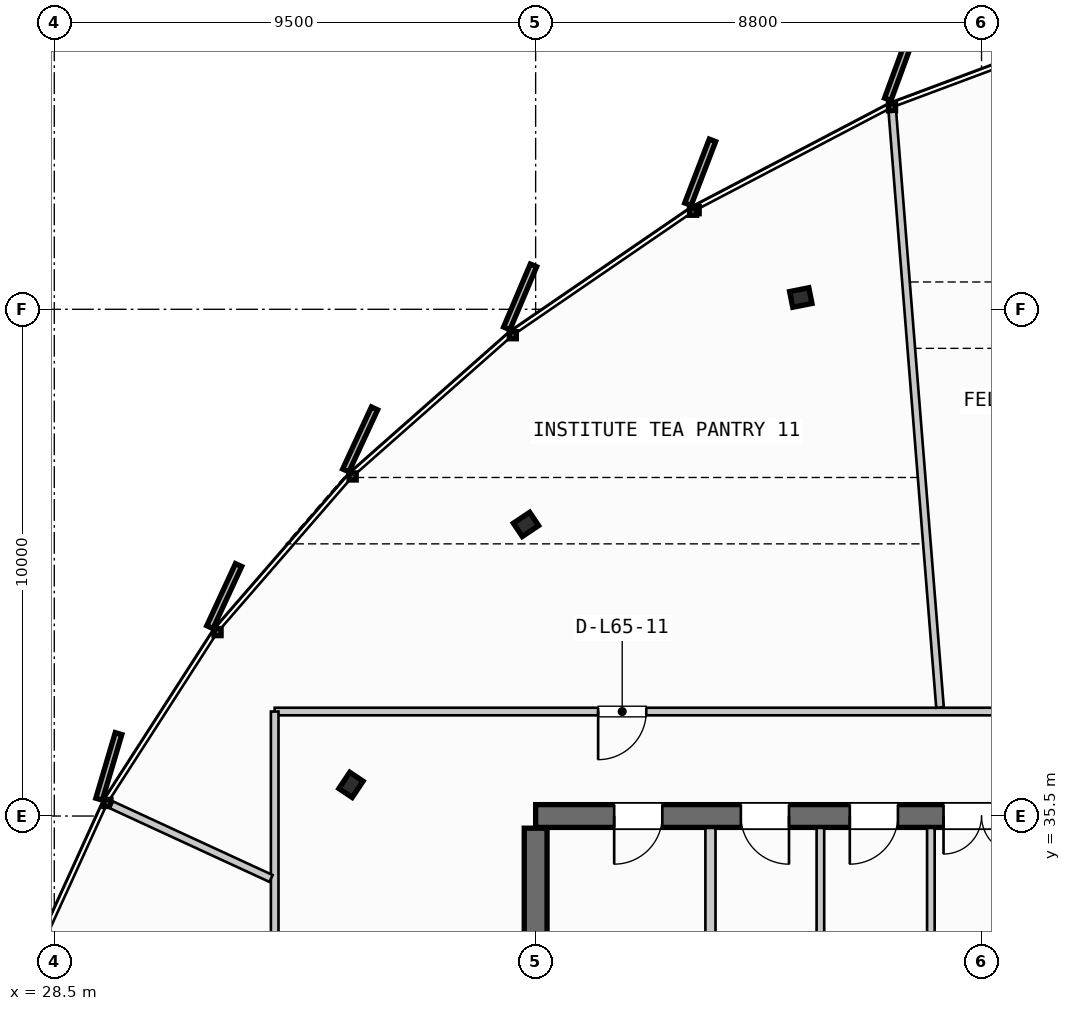
"""IFC4 building model, lengths in metres.
Left out: names, types, materials, properties, quantities, classifications, styles, units other than length and angle.
Written with IfcOpenShell. Run it as: python <this file> out.ifc"""

import sys

from ifc_helpers import new_model, si_unit, direction, frame, frame_2d, origin, origin_2d, place, context, subcontext, project, spatial, rectangle, i_section, extrude, source, transform, mapped, element, fill, save


model = new_model("IFC4")
c1 = context("Model", 3, precision=1e-05, world=origin(), true_north=direction((0.0, 1.0)))
c2 = subcontext(c1, "Body", "Model", "MODEL_VIEW")
j1 = project(units=[si_unit("LENGTHUNIT", "METRE"), si_unit("PLANEANGLEUNIT", "RADIAN")], contexts=[c1])
p1 = place(None, origin())
s1 = spatial("IfcSite", under=j1, at=p1, CompositionType="ELEMENT")
p2 = place(p1, origin())
s2 = spatial("IfcBuilding", under=s1, at=p2, CompositionType="ELEMENT")
p3 = place(p2, frame((0.0, 0.0, 249.1)))
s3 = spatial("IfcBuildingStorey", under=s2, at=p3, CompositionType="ELEMENT", Elevation=249.1)
p4 = place(p3, frame((55.6, 35.5, 0.0), z_axis=(0.0, 0.0, 1.0), x_axis=(-1.0, 0.0, 0.0)))
e1 = element("IfcWall", 1, at=p4, inside=s3, PredefinedType="SHEAR", context=c2, shape_type="SweptSolid", body=[
    extrude(rectangle(XDim=17.6, YDim=0.45, at=frame_2d((8.8, 0.0))), origin(), (0.0, 0.0, 1.0), 3.21),
])
p5 = place(p4, frame((8.05, 0.0, 0.0)))
e2 = element("IfcOpeningElement", 2, at=p5, cuts=e1, PredefinedType="OPENING", context=c2, shape_type="SweptSolid", body=[
    extrude(rectangle(XDim=1.5, YDim=2.2, at=frame_2d((0.75, 1.1))), frame((0.0, 0.235, 0.0), z_axis=(0.0, -1.0, 0.0), x_axis=(1.0, 0.0, 0.0)), (0.0, 0.0, 1.0), 0.47),
])
p6 = place(p4, frame((15.1, 0.0, 0.0)))
e3 = element("IfcOpeningElement", 3, at=p6, cuts=e1, PredefinedType="OPENING", context=c2, shape_type="SweptSolid", body=[
    extrude(rectangle(XDim=0.95, YDim=2.15, at=frame_2d((0.475, 1.075))), frame((0.0, 0.235, 0.0), z_axis=(0.0, -1.0, 0.0), x_axis=(1.0, 0.0, 0.0)), (0.0, 0.0, 1.0), 0.47),
])
p7 = place(p4, frame((12.6, 0.0, 0.0)))
e4 = element("IfcOpeningElement", 4, at=p7, cuts=e1, PredefinedType="OPENING", context=c2, shape_type="SweptSolid", body=[
    extrude(rectangle(XDim=0.95, YDim=2.15, at=frame_2d((0.475, 1.075))), frame((0.0, 0.235, 0.0), z_axis=(0.0, -1.0, 0.0), x_axis=(1.0, 0.0, 0.0)), (0.0, 0.0, 1.0), 0.47),
])
p8 = place(p4, frame((10.45, 0.0, 0.0)))
e5 = element("IfcOpeningElement", 5, at=p8, cuts=e1, PredefinedType="OPENING", context=c2, shape_type="SweptSolid", body=[
    extrude(rectangle(XDim=0.95, YDim=2.15, at=frame_2d((0.475, 1.075))), frame((0.0, 0.235, 0.0), z_axis=(0.0, -1.0, 0.0), x_axis=(1.0, 0.0, 0.0)), (0.0, 0.0, 1.0), 0.47),
])
p9 = place(p3, frame((38.0, 35.26, 0.0), z_axis=(0.0, 0.0, 1.0), x_axis=(0.0, -1.0, 0.0)))
e6 = element("IfcWall", 6, at=p9, inside=s3, PredefinedType="SHEAR", context=c2, shape_type="SweptSolid", body=[
    extrude(rectangle(XDim=14.92, YDim=0.45, at=frame_2d((7.46, 0.0))), origin(), (0.0, 0.0, 1.0), 3.21),
])
p10 = place(p9, frame((5.21, 0.0, 0.0)))
e7 = element("IfcOpeningElement", 7, at=p10, cuts=e6, PredefinedType="OPENING", context=c2, shape_type="SweptSolid", body=[
    extrude(rectangle(XDim=1.1, YDim=2.2, at=frame_2d((0.55, 1.1))), frame((0.0, 0.235, 0.0), z_axis=(0.0, -1.0, 0.0), x_axis=(1.0, 0.0, 0.0)), (0.0, 0.0, 1.0), 0.47),
])
m1 = source(origin(), c2, "Body", "SweptSolid", [
    extrude(i_section(OverallWidth=0.387, OverallDepth=0.316, WebThickness=0.019, FlangeThickness=0.028, FilletRadius=0.015, at=origin_2d()), origin(), (0.0, 0.0, 1.0), 3.21),
])
for number, where, z_axis, x_axis in (
    (8, (43.233, 45.732, 0.0), (0.0, 0.0, 1.0), (-0.195, 0.981, 0.0)),
    (9, (37.81, 41.255, 0.0), (0.0, 0.0, 1.0), (-0.556, 0.831, 0.0)),
    (10, (34.356, 36.115, 0.0), (0.0, 0.0, 1.0), (-0.831, 0.556, 0.0)),
):
    element("IfcColumn", number, at=place(p3, frame(where, z_axis=z_axis, x_axis=x_axis)), inside=s3, PredefinedType="COLUMN", context=c2, shape_type="MappedRepresentation", body=[
        mapped(m1, transform((0.0, 0.0, 0.0), scale=1.0)),
    ])
p11 = place(p3, frame((41.45, 31.85, 0.0), z_axis=(0.0, 0.0, 1.0), x_axis=(0.0, 1.0, 0.0)))
e11 = element("IfcWall", 11, at=p11, inside=s3, PredefinedType="PARTITIONING", context=c2, shape_type="SweptSolid", body=[
    extrude(rectangle(XDim=3.415, YDim=0.2, at=frame_2d((1.708, 0.0))), origin(), (0.0, 0.0, 1.0), 2.28),
])
p12 = place(p3, frame((45.8, 31.85, 0.0), z_axis=(0.0, 0.0, 1.0), x_axis=(0.0, 1.0, 0.0)))
e12 = element("IfcWall", 12, at=p12, inside=s3, PredefinedType="PARTITIONING", context=c2, shape_type="SweptSolid", body=[
    extrude(rectangle(XDim=3.415, YDim=0.15, at=frame_2d((1.708, 0.0))), origin(), (0.0, 0.0, 1.0), 2.28),
])
p13 = place(p3, frame((43.62, 31.85, 0.0), z_axis=(0.0, 0.0, 1.0), x_axis=(0.0, 1.0, 0.0)))
e13 = element("IfcWall", 13, at=p13, inside=s3, PredefinedType="PLUMBINGWALL", context=c2, shape_type="SweptSolid", body=[
    extrude(rectangle(XDim=3.415, YDim=0.15, at=frame_2d((1.708, 0.0))), origin(), (0.0, 0.0, 1.0), 2.28),
])
p14 = place(p3, frame((60.888, 37.562, 0.0), z_axis=(0.0, 0.0, 1.0), x_axis=(-1.0, 0.0, 0.0)))
e14 = element("IfcWall", 14, at=p14, inside=s3, PredefinedType="PARTITIONING", context=c2, shape_type="SweptSolid", body=[
    extrude(rectangle(XDim=28.038, YDim=0.15, at=frame_2d((14.019, 0.0))), origin(), (0.0, 0.0, 1.0), 2.28),
])
p15 = place(p14, frame((4.824, 0.0, 0.0)))
e15 = element("IfcOpeningElement", 15, at=p15, cuts=e14, PredefinedType="OPENING", context=c2, shape_type="SweptSolid", body=[
    extrude(rectangle(XDim=0.95, YDim=2.15, at=frame_2d((0.475, 1.075))), frame((0.0, 0.085, 0.0), z_axis=(0.0, -1.0, 0.0), x_axis=(1.0, 0.0, 0.0)), (0.0, 0.0, 1.0), 0.17),
])
p16 = place(p14, frame((11.973, 0.0, 0.0)))
e16 = element("IfcOpeningElement", 16, at=p16, cuts=e14, PredefinedType="OPENING", context=c2, shape_type="SweptSolid", body=[
    extrude(rectangle(XDim=0.95, YDim=2.15, at=frame_2d((0.475, 1.075))), frame((0.0, 0.085, 0.0), z_axis=(0.0, -1.0, 0.0), x_axis=(1.0, 0.0, 0.0)), (0.0, 0.0, 1.0), 0.17),
])
p17 = place(p14, frame((20.705, 0.0, 0.0)))
e17 = element("IfcOpeningElement", 17, at=p17, cuts=e14, PredefinedType="OPENING", context=c2, shape_type="SweptSolid", body=[
    extrude(rectangle(XDim=0.95, YDim=2.15, at=frame_2d((0.475, 1.075))), frame((0.0, 0.085, 0.0), z_axis=(0.0, -1.0, 0.0), x_axis=(1.0, 0.0, 0.0)), (0.0, 0.0, 1.0), 0.17),
])
p18 = place(p3, frame((32.85, 37.562, 0.0), z_axis=(0.0, 0.0, 1.0), x_axis=(0.0, -1.0, 0.0)))
e18 = element("IfcWall", 18, at=p18, inside=s3, PredefinedType="PARTITIONING", context=c2, shape_type="SweptSolid", body=[
    extrude(rectangle(XDim=19.293, YDim=0.15, at=frame_2d((9.646, 0.0))), origin(), (0.0, 0.0, 1.0), 2.28),
])
p19 = place(p18, frame((15.323, 0.0, 0.0)))
e19 = element("IfcOpeningElement", 19, at=p19, cuts=e18, PredefinedType="OPENING", context=c2, shape_type="SweptSolid", body=[
    extrude(rectangle(XDim=0.95, YDim=2.15, at=frame_2d((0.475, 1.075))), frame((0.0, 0.085, 0.0), z_axis=(0.0, -1.0, 0.0), x_axis=(1.0, 0.0, 0.0)), (0.0, 0.0, 1.0), 0.17),
])
p20 = place(p18, frame((8.408, 0.0, 0.0)))
e20 = element("IfcOpeningElement", 20, at=p20, cuts=e18, PredefinedType="OPENING", context=c2, shape_type="SweptSolid", body=[
    extrude(rectangle(XDim=0.95, YDim=2.15, at=frame_2d((0.475, 1.075))), frame((0.0, 0.085, 0.0), z_axis=(0.0, -1.0, 0.0), x_axis=(1.0, 0.0, 0.0)), (0.0, 0.0, 1.0), 0.17),
])
p21 = place(p3, frame((45.981, 37.642, 0.0), z_axis=(0.0, 0.0, 1.0), x_axis=(-0.079751805429, 0.996814751863, 0.0)))
e21 = element("IfcWall", 21, at=p21, inside=s3, PredefinedType="PARTITIONING", context=c2, shape_type="SweptSolid", body=[
    extrude(rectangle(XDim=11.792, YDim=0.15, at=frame_2d((5.896, 0.0))), origin(), (0.0, 0.0, 1.0), 2.28),
])
p22 = place(p3, frame((32.777, 34.268, 0.0), z_axis=(0.0, 0.0, 1.0), x_axis=(-0.908017096263, 0.418933112673, 0.0)))
e22 = element("IfcWall", 22, at=p22, inside=s3, PredefinedType="PARTITIONING", context=c2, shape_type="SweptSolid", body=[
    extrude(rectangle(XDim=3.466, YDim=0.15, at=frame_2d((1.733, 0.0))), origin(), (0.0, 0.0, 1.0), 2.28),
])
m2 = source(origin(), c2, "Body", "SweptSolid", [
    extrude(rectangle(XDim=1.5, YDim=2.2, at=frame_2d((0.75, 1.1))), frame((0.0, 0.025, 0.0), z_axis=(0.0, -1.0, 0.0), x_axis=(1.0, 0.0, 0.0)), (0.0, 0.0, 1.0), 0.05),
])
p23 = place(p5, origin())
e23 = element("IfcDoor", 23, at=p23, inside=s3, OperationType="DOUBLE_DOOR_SINGLE_SWING", PredefinedType="DOOR", context=c2, shape_type="MappedRepresentation", body=[
    mapped(m2, transform((0.0, 0.0, 0.0), scale=1.0)),
])
fill(e2, e23)
m3 = source(origin(), c2, "Body", "SweptSolid", [
    extrude(rectangle(XDim=0.95, YDim=2.15, at=frame_2d((0.475, 1.075))), frame((0.0, 0.025, 0.0), z_axis=(0.0, -1.0, 0.0), x_axis=(1.0, 0.0, 0.0)), (0.0, 0.0, 1.0), 0.05),
])
p24 = place(p6, origin())
e24 = element("IfcDoor", 24, at=p24, inside=s3, OperationType="SINGLE_SWING_RIGHT", PredefinedType="DOOR", context=c2, shape_type="MappedRepresentation", body=[
    mapped(m3, transform((0.0, 0.0, 0.0), scale=1.0)),
])
fill(e3, e24)
p25 = place(p7, origin())
e25 = element("IfcDoor", 25, at=p25, inside=s3, OperationType="SINGLE_SWING_LEFT", PredefinedType="DOOR", context=c2, shape_type="MappedRepresentation", body=[
    mapped(m3, transform((0.0, 0.0, 0.0), scale=1.0)),
])
fill(e4, e25)
p26 = place(p8, origin())
e26 = element("IfcDoor", 26, at=p26, inside=s3, OperationType="SINGLE_SWING_RIGHT", PredefinedType="DOOR", context=c2, shape_type="MappedRepresentation", body=[
    mapped(m3, transform((0.0, 0.0, 0.0), scale=1.0)),
])
fill(e5, e26)
p27 = place(p17, origin())
e27 = element("IfcDoor", 27, at=p27, inside=s3, OperationType="SINGLE_SWING_RIGHT", PredefinedType="DOOR", context=c2, shape_type="MappedRepresentation", body=[
    mapped(m3, transform((0.0, 0.0, 0.0), scale=1.0)),
])
fill(e17, e27)
save(model, sys.argv[1])
